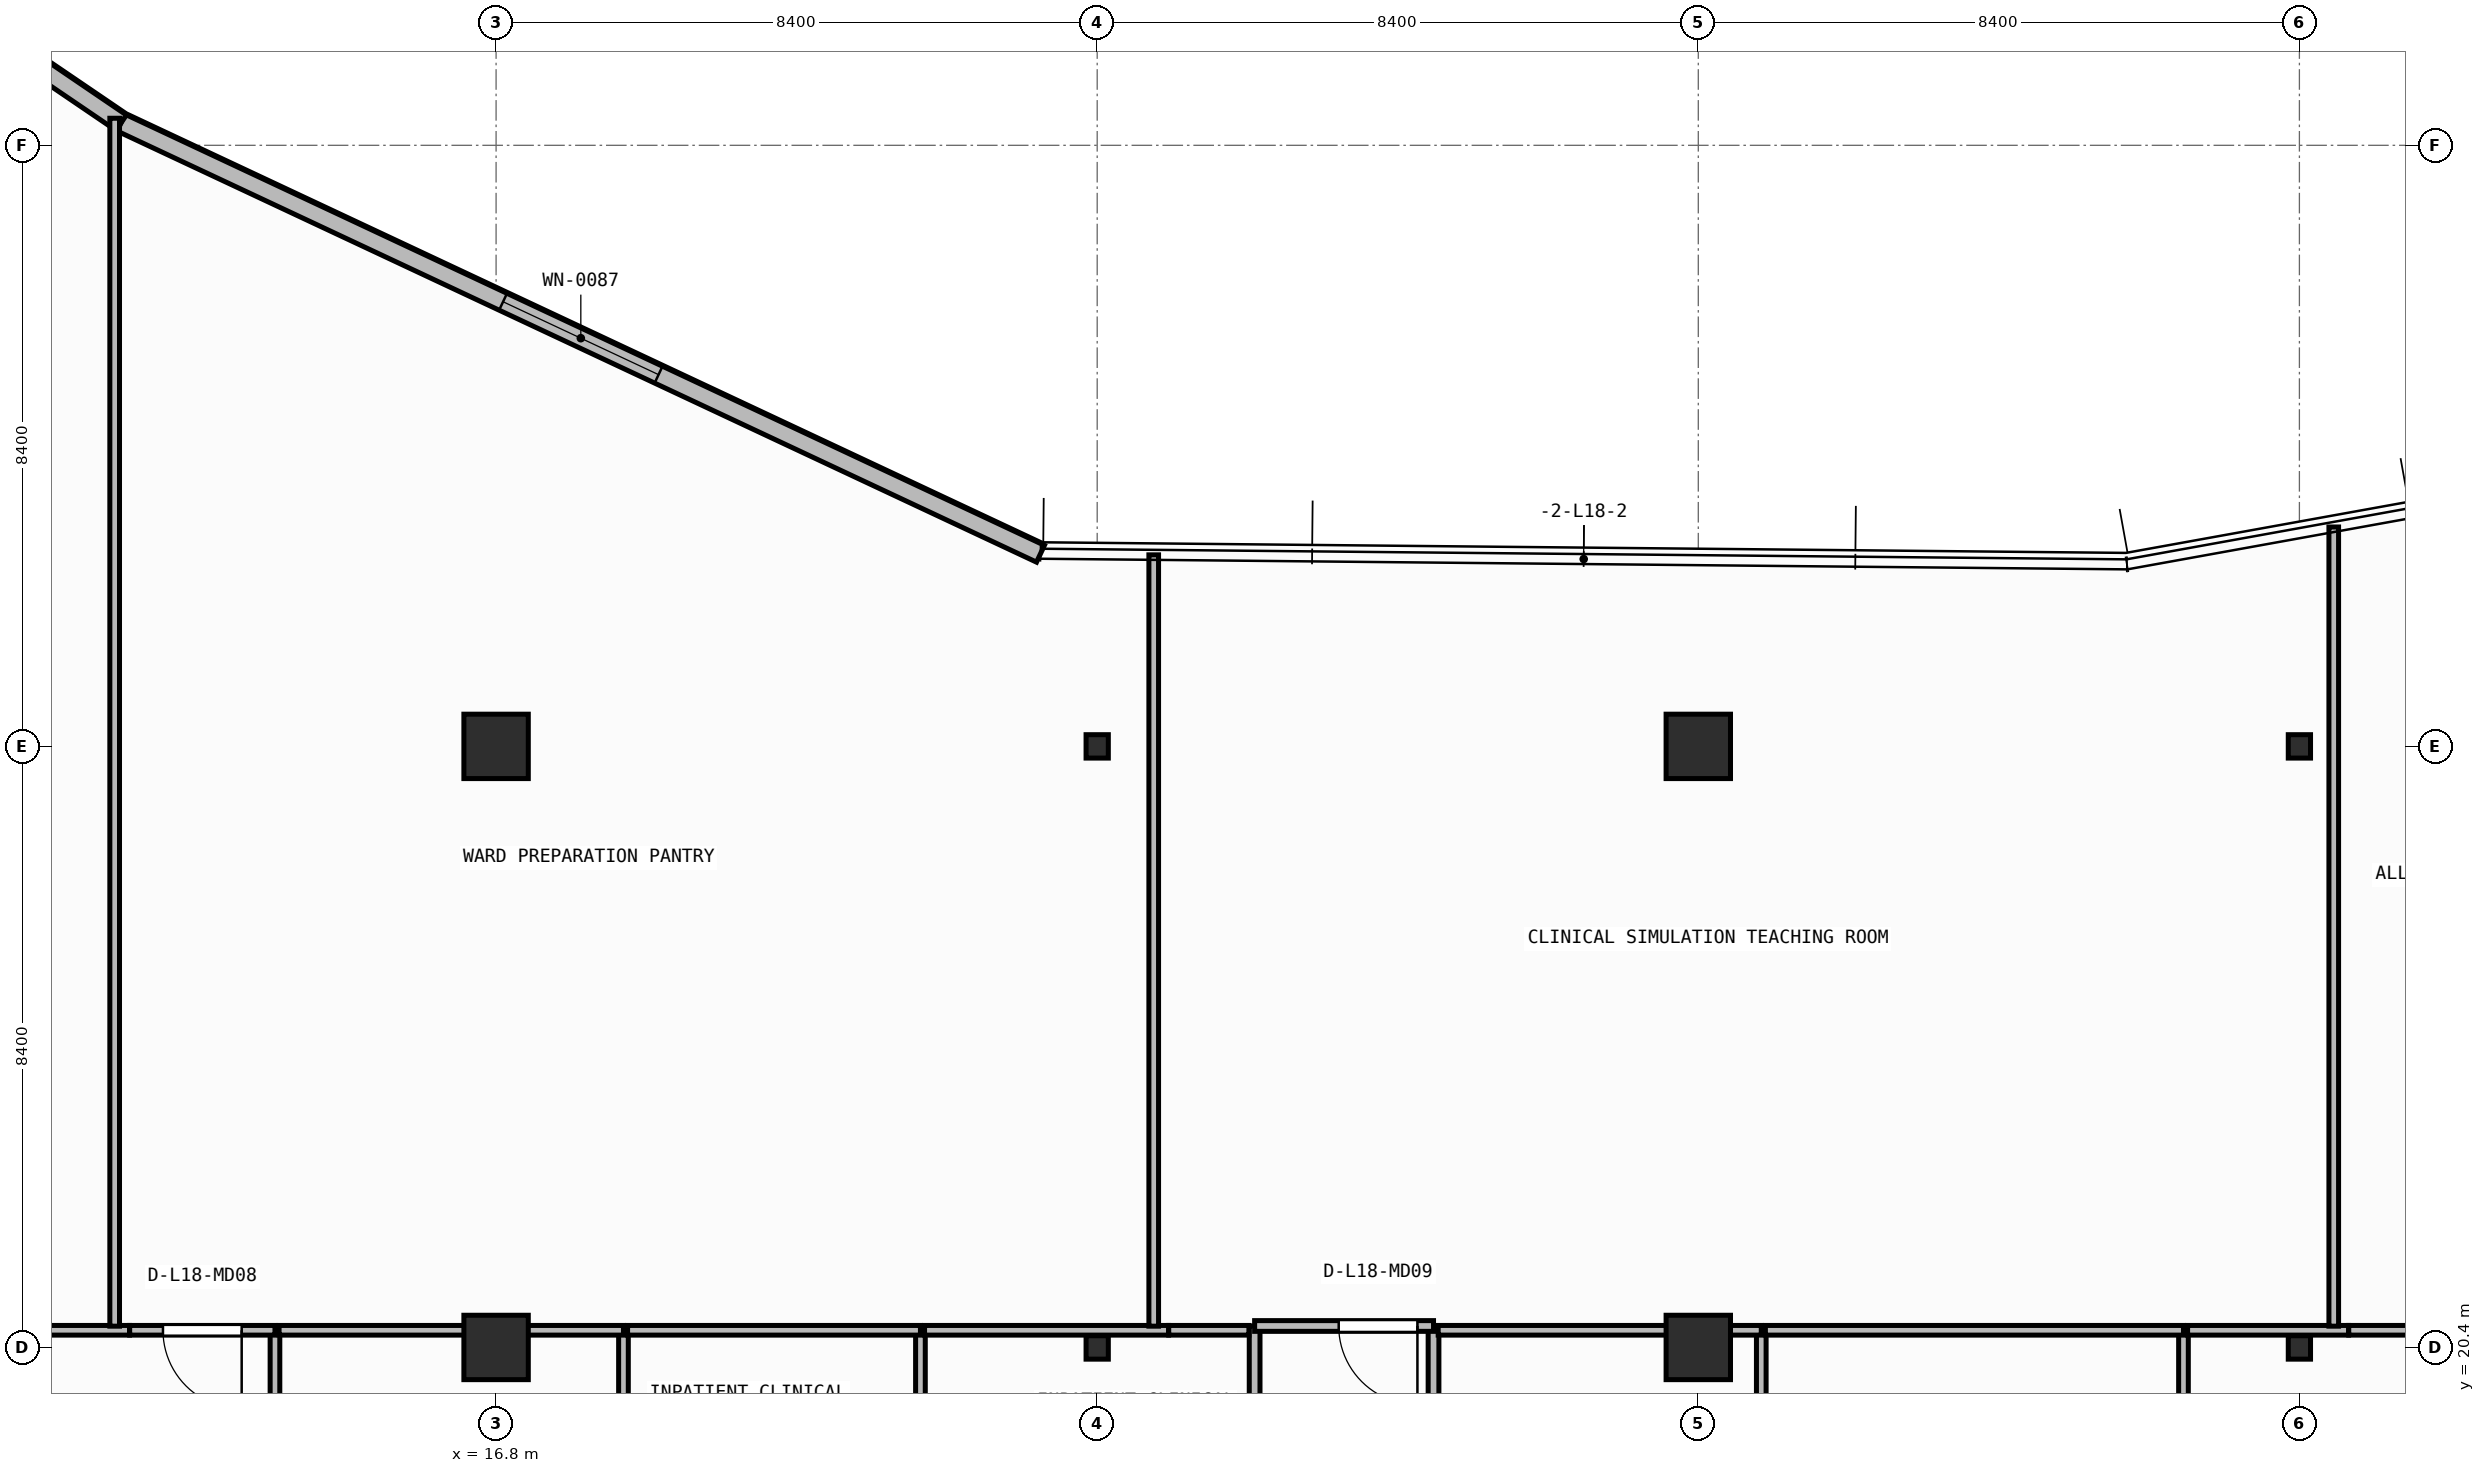
"""IFC4 building model, lengths in metres.
Left out: names, types, materials, properties, quantities, classifications, styles, units other than length and angle.
Written with IfcOpenShell. Run it as: python <this file> out.ifc"""

import sys

from ifc_helpers import new_model, si_unit, direction, frame, frame_2d, origin, origin_2d, place, context, subcontext, project, spatial, rectangle, i_section, extrude, element, fill, save


model = new_model("IFC4")
c1 = context("Model", 3, precision=1e-05, world=origin(), true_north=direction((0.0, 1.0)))
c2 = subcontext(c1, "Body", "Model", "MODEL_VIEW")
j1 = project(units=[si_unit("LENGTHUNIT", "METRE"), si_unit("PLANEANGLEUNIT", "RADIAN")], contexts=[c1])
p1 = place(None, origin())
s1 = spatial("IfcSite", under=j1, at=p1, CompositionType="ELEMENT")
p2 = place(p1, origin())
s2 = spatial("IfcBuilding", under=s1, at=p2, CompositionType="ELEMENT")
p3 = place(p2, frame((0.0, 0.0, 73.85)))
s3 = spatial("IfcBuildingStorey", under=s2, at=p3, CompositionType="ELEMENT", Elevation=73.85)
p4 = place(p3, frame((16.8, 20.4, 0.0), z_axis=(0.0, 0.0, 1.0), x_axis=(1.0, 0.0, 0.0)))
e1 = element("IfcColumn", 1, at=p4, inside=s3, PredefinedType="COLUMN", context=c2, shape_type="SweptSolid", body=[
    extrude(rectangle(XDim=0.9, YDim=0.9, at=origin_2d()), origin(), (0.0, 0.0, 1.0), 3.95),
])
p5 = place(p3, frame((25.2, 20.4, 0.0), z_axis=(0.0, 0.0, 1.0), x_axis=(1.0, 0.0, 0.0)))
e2 = element("IfcColumn", 2, at=p5, inside=s3, PredefinedType="COLUMN", context=c2, shape_type="SweptSolid", body=[
    extrude(i_section(OverallWidth=0.311, OverallDepth=0.327, WebThickness=0.016, FlangeThickness=0.025, FilletRadius=0.017, at=origin_2d()), origin(), (0.0, 0.0, 1.0), 3.95),
])
p6 = place(p3, frame((33.6, 20.4, 0.0), z_axis=(0.0, 0.0, 1.0), x_axis=(1.0, 0.0, 0.0)))
e3 = element("IfcColumn", 3, at=p6, inside=s3, PredefinedType="COLUMN", context=c2, shape_type="SweptSolid", body=[
    extrude(rectangle(XDim=0.9, YDim=0.9, at=origin_2d()), origin(), (0.0, 0.0, 1.0), 3.95),
])
p7 = place(p3, frame((42.0, 20.4, 0.0), z_axis=(0.0, 0.0, 1.0), x_axis=(1.0, 0.0, 0.0)))
e4 = element("IfcColumn", 4, at=p7, inside=s3, PredefinedType="COLUMN", context=c2, shape_type="SweptSolid", body=[
    extrude(i_section(OverallWidth=0.311, OverallDepth=0.327, WebThickness=0.016, FlangeThickness=0.025, FilletRadius=0.017, at=origin_2d()), origin(), (0.0, 0.0, 1.0), 3.95),
])
p8 = place(p3, frame((16.8, 28.8, 0.0), z_axis=(0.0, 0.0, 1.0), x_axis=(1.0, 0.0, 0.0)))
e5 = element("IfcColumn", 5, at=p8, inside=s3, PredefinedType="COLUMN", context=c2, shape_type="SweptSolid", body=[
    extrude(rectangle(XDim=0.9, YDim=0.9, at=origin_2d()), origin(), (0.0, 0.0, 1.0), 3.95),
])
p9 = place(p3, frame((25.2, 28.8, 0.0), z_axis=(0.0, 0.0, 1.0), x_axis=(1.0, 0.0, 0.0)))
e6 = element("IfcColumn", 6, at=p9, inside=s3, PredefinedType="COLUMN", context=c2, shape_type="SweptSolid", body=[
    extrude(i_section(OverallWidth=0.311, OverallDepth=0.327, WebThickness=0.016, FlangeThickness=0.025, FilletRadius=0.017, at=origin_2d()), origin(), (0.0, 0.0, 1.0), 3.95),
])
p10 = place(p3, frame((33.6, 28.8, 0.0), z_axis=(0.0, 0.0, 1.0), x_axis=(1.0, 0.0, 0.0)))
e7 = element("IfcColumn", 7, at=p10, inside=s3, PredefinedType="COLUMN", context=c2, shape_type="SweptSolid", body=[
    extrude(rectangle(XDim=0.9, YDim=0.9, at=origin_2d()), origin(), (0.0, 0.0, 1.0), 3.95),
])
p11 = place(p3, frame((42.0, 28.8, 0.0), z_axis=(0.0, 0.0, 1.0), x_axis=(1.0, 0.0, 0.0)))
e8 = element("IfcColumn", 8, at=p11, inside=s3, PredefinedType="COLUMN", context=c2, shape_type="SweptSolid", body=[
    extrude(i_section(OverallWidth=0.311, OverallDepth=0.327, WebThickness=0.016, FlangeThickness=0.025, FilletRadius=0.017, at=origin_2d()), origin(), (0.0, 0.0, 1.0), 3.95),
])
p12 = place(p3, frame((24.408, 31.492, 0.0), z_axis=(0.0, 0.0, 1.0), x_axis=(-0.905396522918, 0.424566998585, 0.0)))
e9 = element("IfcWall", 9, at=p12, inside=s3, PredefinedType="STANDARD", context=c2, shape_type="SweptSolid", body=[
    extrude(rectangle(XDim=14.189, YDim=0.26, at=frame_2d((7.095, 0.0))), origin(), (0.0, 0.0, 1.0), 3.71),
])
p13 = place(p12, frame((5.895, 0.0, 0.9)))
e10 = element("IfcOpeningElement", 10, at=p13, cuts=e9, PredefinedType="OPENING", context=c2, shape_type="SweptSolid", body=[
    extrude(rectangle(XDim=2.4, YDim=1.65, at=frame_2d((1.2, 0.825))), frame((0.0, 0.14, 0.0), z_axis=(0.0, -1.0, 0.0), x_axis=(1.0, 0.0, 0.0)), (0.0, 0.0, 1.0), 0.28),
])
p14 = place(p3, frame((11.561, 37.517, 0.0), z_axis=(0.0, 0.0, 1.0), x_axis=(-0.827064743936, 0.562106670782, 0.0)))
e11 = element("IfcWall", 11, at=p14, inside=s3, PredefinedType="STANDARD", context=c2, shape_type="SweptSolid", body=[
    extrude(rectangle(XDim=10.641, YDim=0.26, at=frame_2d((5.32, 0.0))), origin(), (0.0, 0.0, 1.0), 3.71),
])
p15 = place(p14, frame((4.12, 0.0, 0.9)))
e12 = element("IfcOpeningElement", 12, at=p15, cuts=e11, PredefinedType="OPENING", context=c2, shape_type="SweptSolid", body=[
    extrude(rectangle(XDim=2.4, YDim=1.65, at=frame_2d((1.2, 0.825))), frame((0.0, 0.14, 0.0), z_axis=(0.0, -1.0, 0.0), x_axis=(1.0, 0.0, 0.0)), (0.0, 0.0, 1.0), 0.28),
])
for number, where, z_axis, x_axis in (
    (13, (27.4, 20.7, 0.0), (0.0, 0.0, 1.0), (0.0, -1.0, 0.0)),
    (14, (29.9, 14.7, 0.0), (0.0, 0.0, 1.0), (0.0, 1.0, 0.0)),
):
    element("IfcWall", number, at=place(p3, frame(where, z_axis=z_axis, x_axis=x_axis)), inside=s3, PredefinedType="PARTITIONING", context=c2, shape_type="SweptSolid", body=[
        extrude(rectangle(XDim=6.0, YDim=0.15, at=frame_2d((3.0, 0.0))), origin(), (0.0, 0.0, 1.0), 3.71),
    ])
p16 = place(p3, frame((29.9, 20.7, 0.0), z_axis=(0.0, 0.0, 1.0), x_axis=(-1.0, 0.0, 0.0)))
e15 = element("IfcWall", 15, at=p16, inside=s3, PredefinedType="PARTITIONING", context=c2, shape_type="SweptSolid", body=[
    extrude(rectangle(XDim=2.5, YDim=0.15, at=frame_2d((1.25, 0.0))), origin(), (0.0, 0.0, 1.0), 3.073),
])
p17 = place(p16, frame((0.225, 0.0, 0.0)))
e16 = element("IfcOpeningElement", 16, at=p17, cuts=e15, PredefinedType="OPENING", context=c2, shape_type="SweptSolid", body=[
    extrude(rectangle(XDim=1.1, YDim=2.1, at=frame_2d((0.55, 1.05))), frame((0.0, 0.085, 0.0), z_axis=(0.0, -1.0, 0.0), x_axis=(1.0, 0.0, 0.0)), (0.0, 0.0, 1.0), 0.17),
])
p18 = place(p3, frame((13.71, 17.833, 0.0), z_axis=(0.0, 0.0, 1.0), x_axis=(0.0, 1.0, 0.0)))
e17 = element("IfcWall", 17, at=p18, inside=s3, PredefinedType="PARTITIONING", context=c2, shape_type="SweptSolid", body=[
    extrude(rectangle(XDim=2.807, YDim=0.135, at=frame_2d((1.404, 0.0))), origin(), (0.0, 0.0, 1.0), 3.71),
])
p19 = place(p3, frame((11.677, 20.64, 0.0), z_axis=(0.0, 0.0, 1.0), x_axis=(-1.0, 0.0, 0.0)))
e18 = element("IfcWall", 18, at=p19, inside=s3, PredefinedType="PARTITIONING", context=c2, shape_type="SweptSolid", body=[
    extrude(rectangle(XDim=2.42, YDim=0.135, at=frame_2d((1.21, 0.0))), origin(), (0.0, 0.0, 1.0), 3.073),
])
p20 = place(p3, frame((13.71, 20.64, 0.0), z_axis=(0.0, 0.0, 1.0), x_axis=(-1.0, 0.0, 0.0)))
e19 = element("IfcWall", 19, at=p20, inside=s3, PredefinedType="PARTITIONING", context=c2, shape_type="SweptSolid", body=[
    extrude(rectangle(XDim=2.031, YDim=0.135, at=frame_2d((1.015, 0.0))), origin(), (0.0, 0.0, 1.0), 3.073),
])
p21 = place(p20, frame((0.465, 0.0, 0.0)))
e20 = element("IfcOpeningElement", 20, at=p21, cuts=e19, PredefinedType="OPENING", context=c2, shape_type="SweptSolid", body=[
    extrude(rectangle(XDim=1.1, YDim=2.1, at=frame_2d((0.55, 1.05))), frame((0.0, 0.077, 0.0), z_axis=(0.0, -1.0, 0.0), x_axis=(1.0, 0.0, 0.0)), (0.0, 0.0, 1.0), 0.155),
])
p22 = place(p3, frame((18.58, 17.833, 0.0), z_axis=(0.0, 0.0, 1.0), x_axis=(0.0, 1.0, 0.0)))
e21 = element("IfcWall", 21, at=p22, inside=s3, PredefinedType="PARTITIONING", context=c2, shape_type="SweptSolid", body=[
    extrude(rectangle(XDim=2.807, YDim=0.135, at=frame_2d((1.404, 0.0))), origin(), (0.0, 0.0, 1.0), 3.71),
])
p23 = place(p3, frame((18.58, 20.64, 0.0), z_axis=(0.0, 0.0, 1.0), x_axis=(-1.0, 0.0, 0.0)))
e22 = element("IfcWall", 22, at=p23, inside=s3, PredefinedType="PARTITIONING", context=c2, shape_type="SweptSolid", body=[
    extrude(rectangle(XDim=4.812, YDim=0.135, at=frame_2d((2.406, 0.0))), origin(), (0.0, 0.0, 1.0), 3.073),
])
p24 = place(p3, frame((22.73, 17.833, 0.0), z_axis=(0.0, 0.0, 1.0), x_axis=(0.0, 1.0, 0.0)))
e23 = element("IfcWall", 23, at=p24, inside=s3, PredefinedType="PARTITIONING", context=c2, shape_type="SweptSolid", body=[
    extrude(rectangle(XDim=2.807, YDim=0.135, at=frame_2d((1.404, 0.0))), origin(), (0.0, 0.0, 1.0), 3.71),
])
p25 = place(p3, frame((22.73, 20.64, 0.0), z_axis=(0.0, 0.0, 1.0), x_axis=(-1.0, 0.0, 0.0)))
e24 = element("IfcWall", 24, at=p25, inside=s3, PredefinedType="PARTITIONING", context=c2, shape_type="SweptSolid", body=[
    extrude(rectangle(XDim=4.093, YDim=0.135, at=frame_2d((2.046, 0.0))), origin(), (0.0, 0.0, 1.0), 3.073),
])
p26 = place(p3, frame((26.198, 20.64, 0.0), z_axis=(0.0, 0.0, 1.0), x_axis=(-1.0, 0.0, 0.0)))
e25 = element("IfcWall", 25, at=p26, inside=s3, PredefinedType="PARTITIONING", context=c2, shape_type="SweptSolid", body=[
    extrude(rectangle(XDim=3.41, YDim=0.135, at=frame_2d((1.705, 0.0))), origin(), (0.0, 0.0, 1.0), 3.073),
])
p27 = place(p3, frame((27.32, 20.64, 0.0), z_axis=(0.0, 0.0, 1.0), x_axis=(-1.0, 0.0, 0.0)))
e26 = element("IfcWall", 26, at=p27, inside=s3, PredefinedType="PARTITIONING", context=c2, shape_type="SweptSolid", body=[
    extrude(rectangle(XDim=1.121, YDim=0.135, at=frame_2d((0.56, 0.0))), origin(), (0.0, 0.0, 1.0), 3.073),
])
p28 = place(p3, frame((34.48, 14.76, 0.0), z_axis=(0.0, 0.0, 1.0), x_axis=(0.0, 1.0, 0.0)))
e27 = element("IfcWall", 27, at=p28, inside=s3, PredefinedType="PARTITIONING", context=c2, shape_type="SweptSolid", body=[
    extrude(rectangle(XDim=5.88, YDim=0.135, at=frame_2d((2.94, 0.0))), origin(), (0.0, 0.0, 1.0), 3.71),
])
p29 = place(p3, frame((34.48, 20.64, 0.0), z_axis=(0.0, 0.0, 1.0), x_axis=(-1.0, 0.0, 0.0)))
e28 = element("IfcWall", 28, at=p29, inside=s3, PredefinedType="PARTITIONING", context=c2, shape_type="SweptSolid", body=[
    extrude(rectangle(XDim=4.515, YDim=0.135, at=frame_2d((2.257, 0.0))), origin(), (0.0, 0.0, 1.0), 3.073),
])
p30 = place(p3, frame((40.38, 14.76, 0.0), z_axis=(0.0, 0.0, 1.0), x_axis=(0.0, 1.0, 0.0)))
e29 = element("IfcWall", 29, at=p30, inside=s3, PredefinedType="PARTITIONING", context=c2, shape_type="SweptSolid", body=[
    extrude(rectangle(XDim=5.88, YDim=0.135, at=frame_2d((2.94, 0.0))), origin(), (0.0, 0.0, 1.0), 3.71),
])
p31 = place(p3, frame((40.38, 20.64, 0.0), z_axis=(0.0, 0.0, 1.0), x_axis=(-1.0, 0.0, 0.0)))
e30 = element("IfcWall", 30, at=p31, inside=s3, PredefinedType="PARTITIONING", context=c2, shape_type="SweptSolid", body=[
    extrude(rectangle(XDim=5.842, YDim=0.135, at=frame_2d((2.921, 0.0))), origin(), (0.0, 0.0, 1.0), 3.073),
])
p32 = place(p3, frame((42.688, 20.64, 0.0), z_axis=(0.0, 0.0, 1.0), x_axis=(-1.0, 0.0, 0.0)))
e31 = element("IfcWall", 31, at=p32, inside=s3, PredefinedType="PARTITIONING", context=c2, shape_type="SweptSolid", body=[
    extrude(rectangle(XDim=2.25, YDim=0.135, at=frame_2d((1.125, 0.0))), origin(), (0.0, 0.0, 1.0), 3.073),
])
p33 = place(p3, frame((48.47, 20.64, 0.0), z_axis=(0.0, 0.0, 1.0), x_axis=(-1.0, 0.0, 0.0)))
e32 = element("IfcWall", 32, at=p33, inside=s3, PredefinedType="PARTITIONING", context=c2, shape_type="SweptSolid", body=[
    extrude(rectangle(XDim=5.781, YDim=0.135, at=frame_2d((2.89, 0.0))), origin(), (0.0, 0.0, 1.0), 3.073),
])
p34 = place(p33, frame((1.912, 0.0, 0.0)))
e33 = element("IfcOpeningElement", 33, at=p34, cuts=e32, PredefinedType="OPENING", context=c2, shape_type="SweptSolid", body=[
    extrude(rectangle(XDim=1.1, YDim=2.1, at=frame_2d((0.55, 1.05))), frame((0.0, 0.077, 0.0), z_axis=(0.0, -1.0, 0.0), x_axis=(1.0, 0.0, 0.0)), (0.0, 0.0, 1.0), 0.155),
])
p35 = place(p3, frame((11.47, 20.698, 0.0), z_axis=(0.0, 0.0, 1.0), x_axis=(0.0, 1.0, 0.0)))
e34 = element("IfcWall", 34, at=p35, inside=s3, PredefinedType="PARTITIONING", context=c2, shape_type="SweptSolid", body=[
    extrude(rectangle(XDim=16.881, YDim=0.135, at=frame_2d((8.44, 0.0))), origin(), (0.0, 0.0, 1.0), 3.71),
])
p36 = place(p3, frame((25.99, 20.698, 0.0), z_axis=(0.0, 0.0, 1.0), x_axis=(0.0, 1.0, 0.0)))
e35 = element("IfcWall", 35, at=p36, inside=s3, PredefinedType="PARTITIONING", context=c2, shape_type="SweptSolid", body=[
    extrude(rectangle(XDim=10.779, YDim=0.135, at=frame_2d((5.39, 0.0))), origin(), (0.0, 0.0, 1.0), 3.71),
])
p37 = place(p3, frame((42.48, 20.698, 0.0), z_axis=(0.0, 0.0, 1.0), x_axis=(0.0, 1.0, 0.0)))
e36 = element("IfcWall", 36, at=p37, inside=s3, PredefinedType="PARTITIONING", context=c2, shape_type="SweptSolid", body=[
    extrude(rectangle(XDim=11.169, YDim=0.135, at=frame_2d((5.584, 0.0))), origin(), (0.0, 0.0, 1.0), 3.073),
])
p38 = place(p13, origin())
e37 = element("IfcWindow", 37, at=p38, inside=s3, PartitioningType="SINGLE_PANEL", PredefinedType="WINDOW", context=c2, shape_type="SweptSolid", body=[
    extrude(rectangle(XDim=2.4, YDim=1.65, at=frame_2d((1.2, 0.825))), frame((0.0, 0.03, 0.0), z_axis=(0.0, -1.0, 0.0), x_axis=(1.0, 0.0, 0.0)), (0.0, 0.0, 1.0), 0.06),
])
fill(e10, e37)
p39 = place(p17, origin())
e38 = element("IfcDoor", 38, at=p39, inside=s3, OperationType="SINGLE_SWING_LEFT", PredefinedType="DOOR", context=c2, shape_type="SweptSolid", body=[
    extrude(rectangle(XDim=1.1, YDim=2.1, at=frame_2d((0.55, 1.05))), frame((0.0, 0.025, 0.0), z_axis=(0.0, -1.0, 0.0), x_axis=(1.0, 0.0, 0.0)), (0.0, 0.0, 1.0), 0.05),
])
fill(e16, e38)
p40 = place(p21, origin())
e39 = element("IfcDoor", 39, at=p40, inside=s3, OperationType="SINGLE_SWING_LEFT", PredefinedType="DOOR", context=c2, shape_type="SweptSolid", body=[
    extrude(rectangle(XDim=1.1, YDim=2.1, at=frame_2d((0.55, 1.05))), frame((0.0, 0.025, 0.0), z_axis=(0.0, -1.0, 0.0), x_axis=(1.0, 0.0, 0.0)), (0.0, 0.0, 1.0), 0.05),
])
fill(e20, e39)
save(model, sys.argv[1])
